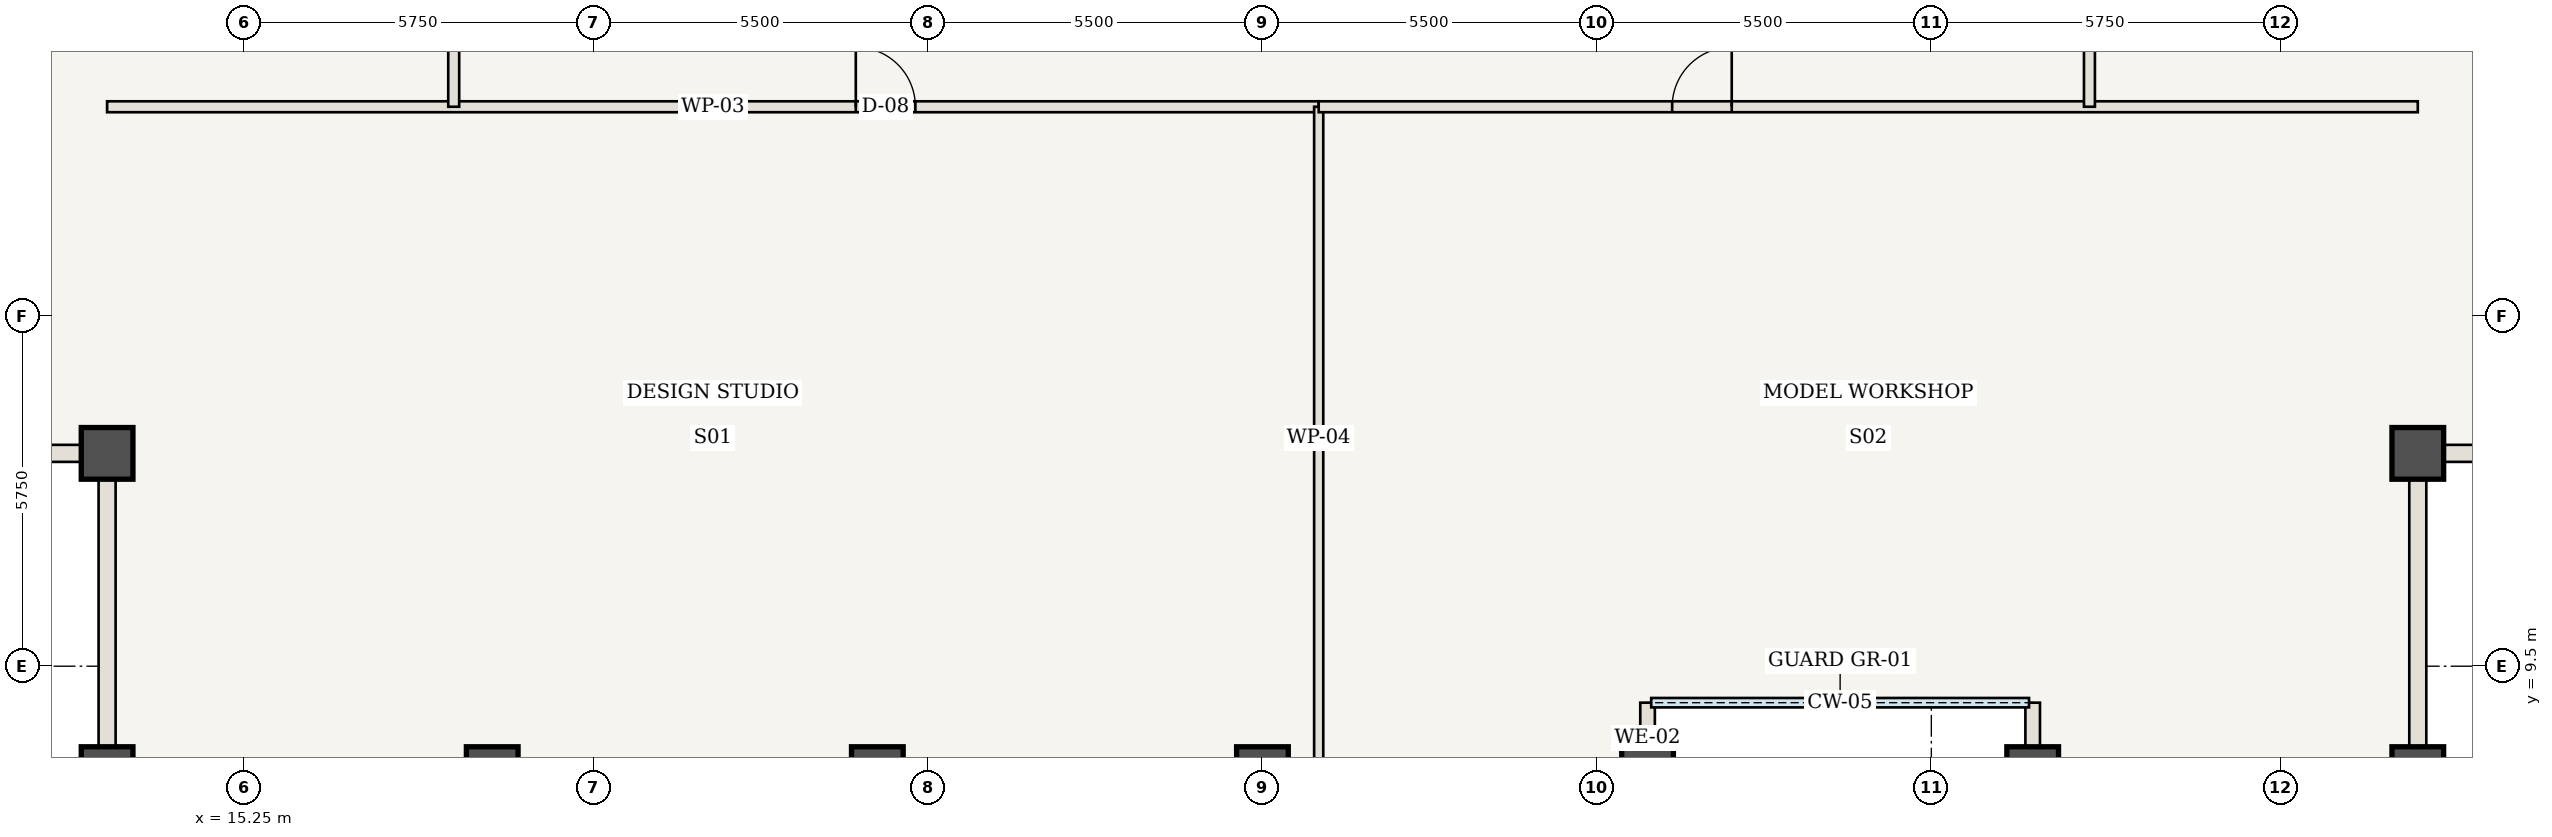
"""IFC4 building model, lengths in metres.
Left out: names, types, materials, properties, quantities, classifications, styles, units other than length and angle.
Written with IfcOpenShell. Run it as: python <this file> out.ifc"""

import sys

from ifc_helpers import new_model, si_unit, direction, frame, frame_2d, origin, origin_2d, place, context, subcontext, project, spatial, rectangle, extrude, element, fill, save


model = new_model("IFC4")
c1 = context("Model", 3, precision=1e-05, world=origin(), true_north=direction((0.0, 1.0)))
c2 = subcontext(c1, "Body", "Model", "MODEL_VIEW")
j1 = project(units=[si_unit("LENGTHUNIT", "METRE"), si_unit("PLANEANGLEUNIT", "RADIAN")], contexts=[c1])
p1 = place(None, origin())
s1 = spatial("IfcSite", under=j1, at=p1, CompositionType="ELEMENT")
p2 = place(p1, origin())
s2 = spatial("IfcBuilding", under=s1, at=p2, CompositionType="ELEMENT")
p3 = place(p2, frame((0.0, 0.0, 210.0)))
s3 = spatial("IfcBuildingStorey", under=s2, at=p3, CompositionType="ELEMENT", Elevation=210.0)
for number, where, z_axis, x_axis in (
    (1, (13.0, 7.75, 0.0), (0.0, 0.0, 1.0), (1.0, 0.0, 0.0)),
    (2, (13.0, 13.0, 0.0), (0.0, 0.0, 1.0), (1.0, 0.0, 0.0)),
    (3, (51.0, 7.75, 0.0), (0.0, 0.0, 1.0), (1.0, 0.0, 0.0)),
    (4, (51.0, 13.0, 0.0), (0.0, 0.0, 1.0), (1.0, 0.0, 0.0)),
    (5, (19.333, 7.75, 0.0), (0.0, 0.0, 1.0), (1.0, 0.0, 0.0)),
    (6, (25.667, 7.75, 0.0), (0.0, 0.0, 1.0), (1.0, 0.0, 0.0)),
    (7, (32.0, 7.75, 0.0), (0.0, 0.0, 1.0), (1.0, 0.0, 0.0)),
    (8, (38.333, 7.75, 0.0), (0.0, 0.0, 1.0), (1.0, 0.0, 0.0)),
    (9, (44.667, 7.75, 0.0), (0.0, 0.0, 1.0), (1.0, 0.0, 0.0)),
):
    element("IfcColumn", number, at=place(p3, frame(where, z_axis=z_axis, x_axis=x_axis)), inside=s3, PredefinedType="COLUMN", context=c2, shape_type="SweptSolid", body=[
        extrude(rectangle(XDim=0.85, YDim=0.85, at=origin_2d()), origin(), (0.0, 0.0, 1.0), 3.85),
    ])
p4 = place(p3, frame((13.0, 18.7, 0.0), z_axis=(0.0, 0.0, 1.0), x_axis=(1.0, 0.0, 0.0)))
e10 = element("IfcWall", 10, at=p4, inside=s3, PredefinedType="STANDARD", context=c2, shape_type="SweptSolid", body=[
    extrude(rectangle(XDim=19.925, YDim=0.18, at=frame_2d((9.962, 0.0))), origin(), (0.0, 0.0, 1.0), 3.685),
])
p5 = place(p4, frame((12.312, 0.0, 0.0)))
e11 = element("IfcOpeningElement", 11, at=p5, cuts=e10, PredefinedType="OPENING", context=c2, shape_type="SweptSolid", body=[
    extrude(rectangle(XDim=0.98, YDim=2.2, at=frame_2d((0.49, 1.1))), frame((0.0, 0.1, 0.0), z_axis=(0.0, -1.0, 0.0), x_axis=(1.0, 0.0, 0.0)), (0.0, 0.0, 1.0), 0.2),
])
p6 = place(p3, frame((32.925, 7.81, 0.0), z_axis=(0.0, 0.0, 1.0), x_axis=(0.0, 1.0, 0.0)))
e12 = element("IfcWall", 12, at=p6, inside=s3, PredefinedType="STANDARD", context=c2, shape_type="SweptSolid", body=[
    extrude(rectangle(XDim=10.89, YDim=0.15, at=frame_2d((5.445, 0.0))), origin(), (0.0, 0.0, 1.0), 3.685),
])
p7 = place(p3, frame((32.925, 18.7, 0.0), z_axis=(0.0, 0.0, 1.0), x_axis=(1.0, 0.0, 0.0)))
e13 = element("IfcWall", 13, at=p7, inside=s3, PredefinedType="STANDARD", context=c2, shape_type="SweptSolid", body=[
    extrude(rectangle(XDim=18.075, YDim=0.18, at=frame_2d((9.038, 0.0))), origin(), (0.0, 0.0, 1.0), 3.685),
])
p8 = place(p7, frame((5.812, 0.0, 0.0)))
e14 = element("IfcOpeningElement", 14, at=p8, cuts=e13, PredefinedType="OPENING", context=c2, shape_type="SweptSolid", body=[
    extrude(rectangle(XDim=0.98, YDim=2.2, at=frame_2d((0.49, 1.1))), frame((0.0, 0.1, 0.0), z_axis=(0.0, -1.0, 0.0), x_axis=(1.0, 0.0, 0.0)), (0.0, 0.0, 1.0), 0.2),
])
p9 = place(p3, frame((18.7, 18.7, 0.0), z_axis=(0.0, 0.0, 1.0), x_axis=(0.0, 1.0, 0.0)))
e15 = element("IfcWall", 15, at=p9, inside=s3, PredefinedType="STANDARD", context=c2, shape_type="SweptSolid", body=[
    extrude(rectangle(XDim=6.192, YDim=0.18, at=frame_2d((3.096, 0.0))), origin(), (0.0, 0.0, 1.0), 3.685),
])
p10 = place(p9, frame((1.146, 0.0, 0.0)))
e16 = element("IfcOpeningElement", 16, at=p10, cuts=e15, PredefinedType="OPENING", context=c2, shape_type="SweptSolid", body=[
    extrude(rectangle(XDim=0.98, YDim=2.2, at=frame_2d((0.49, 1.1))), frame((0.0, 0.1, 0.0), z_axis=(0.0, -1.0, 0.0), x_axis=(1.0, 0.0, 0.0)), (0.0, 0.0, 1.0), 0.2),
])
p11 = place(p3, frame((45.6, 18.7, 0.0), z_axis=(0.0, 0.0, 1.0), x_axis=(0.0, 1.0, 0.0)))
e17 = element("IfcWall", 17, at=p11, inside=s3, PredefinedType="STANDARD", context=c2, shape_type="SweptSolid", body=[
    extrude(rectangle(XDim=14.15, YDim=0.18, at=frame_2d((7.075, 0.0))), origin(), (0.0, 0.0, 1.0), 3.685),
])
p12 = place(p11, frame((6.575, 0.0, 0.0)))
e18 = element("IfcOpeningElement", 18, at=p12, cuts=e17, PredefinedType="OPENING", context=c2, shape_type="SweptSolid", body=[
    extrude(rectangle(XDim=0.98, YDim=2.2, at=frame_2d((0.49, 1.1))), frame((0.0, 0.1, 0.0), z_axis=(0.0, -1.0, 0.0), x_axis=(1.0, 0.0, 0.0)), (0.0, 0.0, 1.0), 0.2),
])
for number, where, z_axis, x_axis in (
    (19, (38.333, 7.75, 0.0), (0.0, 0.0, 1.0), (0.0, 1.0, 0.0)),
    (20, (44.667, 7.75, 0.0), (0.0, 0.0, 1.0), (0.0, 1.0, 0.0)),
):
    element("IfcWall", number, at=place(p3, frame(where, z_axis=z_axis, x_axis=x_axis)), inside=s3, PredefinedType="USERDEFINED", context=c2, shape_type="SweptSolid", body=[
        extrude(rectangle(XDim=1.15, YDim=0.24, at=frame_2d((0.575, 0.0))), origin(), (0.0, 0.0, 1.0), 2.985),
    ])
for number, where, z_axis, x_axis in (
    (21, (13.0, 7.75, 0.0), (0.0, 0.0, 1.0), (0.0, 1.0, 0.0)),
    (22, (13.0, 13.0, 0.0), (0.0, 0.0, 1.0), (-1.0, 0.0, 0.0)),
    (23, (51.0, 13.0, 0.0), (0.0, 0.0, 1.0), (0.0, -1.0, 0.0)),
    (24, (56.25, 13.0, 0.0), (0.0, 0.0, 1.0), (-1.0, 0.0, 0.0)),
):
    element("IfcWall", number, at=place(p3, frame(where, z_axis=z_axis, x_axis=x_axis)), inside=s3, PredefinedType="USERDEFINED", context=c2, shape_type="SweptSolid", body=[
        extrude(rectangle(XDim=5.25, YDim=0.28, at=frame_2d((2.625, 0.0))), origin(), (0.0, 0.0, 1.0), 2.985),
    ])
p13 = place(p5, origin())
e25 = element("IfcDoor", 25, at=p13, inside=s3, OperationType="SINGLE_SWING_LEFT", PredefinedType="DOOR", context=c2, shape_type="SweptSolid", body=[
    extrude(rectangle(XDim=0.98, YDim=2.2, at=frame_2d((0.49, 1.1))), frame((0.0, 0.025, 0.0), z_axis=(0.0, -1.0, 0.0), x_axis=(1.0, 0.0, 0.0)), (0.0, 0.0, 1.0), 0.05),
])
fill(e11, e25)
p14 = place(p8, origin())
e26 = element("IfcDoor", 26, at=p14, inside=s3, OperationType="SINGLE_SWING_RIGHT", PredefinedType="DOOR", context=c2, shape_type="SweptSolid", body=[
    extrude(rectangle(XDim=0.98, YDim=2.2, at=frame_2d((0.49, 1.1))), frame((0.0, 0.025, 0.0), z_axis=(0.0, -1.0, 0.0), x_axis=(1.0, 0.0, 0.0)), (0.0, 0.0, 1.0), 0.05),
])
fill(e14, e26)
save(model, sys.argv[1])
